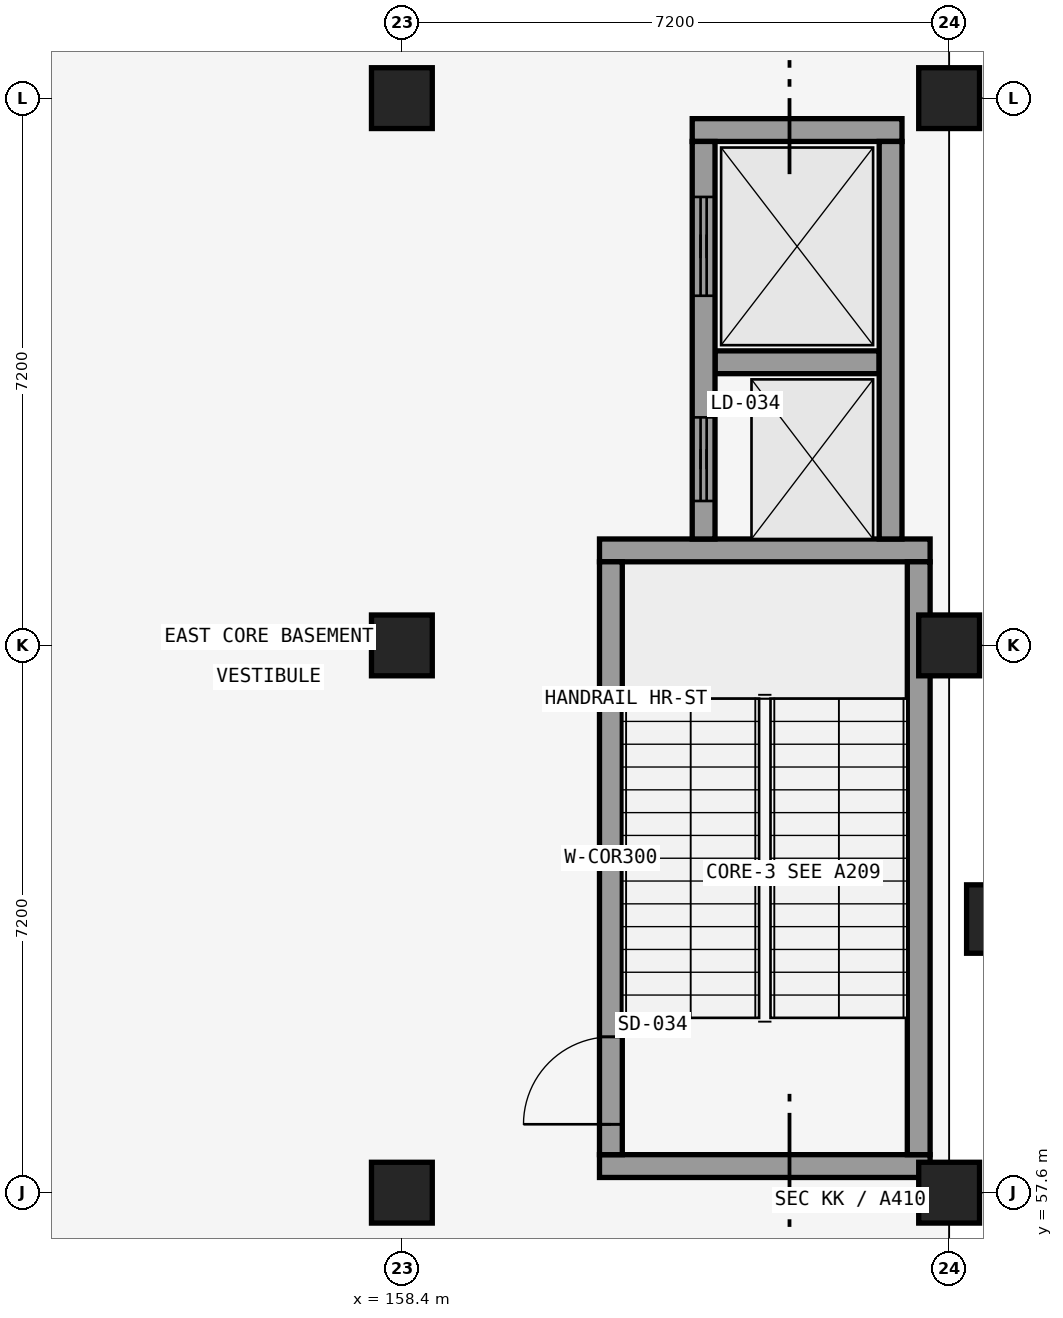
"""IFC4 building model, lengths in metres.
Left out: names, types, materials, properties, quantities, classifications, styles, units other than length and angle.
Written with IfcOpenShell. Run it as: python <this file> out.ifc"""

import sys

from ifc_helpers import new_model, si_unit, direction, frame, frame_2d, origin, origin_2d, place, context, subcontext, project, spatial, rectangle, extrude, element, fill, save


model = new_model("IFC4")
c1 = context("Model", 3, precision=1e-05, world=origin(), true_north=direction((0.0, 1.0)))
c2 = subcontext(c1, "Body", "Model", "MODEL_VIEW")
j1 = project(units=[si_unit("LENGTHUNIT", "METRE"), si_unit("PLANEANGLEUNIT", "RADIAN")], contexts=[c1])
p1 = place(None, origin())
s1 = spatial("IfcSite", under=j1, at=p1, CompositionType="ELEMENT")
p2 = place(p1, origin())
s2 = spatial("IfcBuilding", under=s1, at=p2, CompositionType="ELEMENT")
p3 = place(p2, frame((0.0, 0.0, -4.8)))
s3 = spatial("IfcBuildingStorey", under=s2, at=p3, CompositionType="ELEMENT", Elevation=-4.8)
for number, where, z_axis, x_axis in (
    (1, (158.4, 57.6, 0.0), (0.0, 0.0, 1.0), (1.0, 0.0, 0.0)),
    (2, (158.4, 64.8, 0.0), (0.0, 0.0, 1.0), (1.0, 0.0, 0.0)),
    (3, (158.4, 72.0, 0.0), (0.0, 0.0, 1.0), (1.0, 0.0, 0.0)),
    (4, (165.6, 57.6, 0.0), (0.0, 0.0, 1.0), (1.0, 0.0, 0.0)),
    (5, (165.6, 64.8, 0.0), (0.0, 0.0, 1.0), (1.0, 0.0, 0.0)),
    (6, (165.6, 72.0, 0.0), (0.0, 0.0, 1.0), (1.0, 0.0, 0.0)),
):
    element("IfcColumn", number, at=place(p3, frame(where, z_axis=z_axis, x_axis=x_axis)), inside=s3, PredefinedType="COLUMN", context=c2, shape_type="SweptSolid", body=[
        extrude(rectangle(XDim=0.8, YDim=0.8, at=origin_2d()), origin(), (0.0, 0.0, 1.0), 4.8),
    ])
p4 = place(p3, frame((166.08, 61.2, 0.0), z_axis=(0.0, 0.0, 1.0), x_axis=(1.0, 0.0, 0.0)))
e7 = element("IfcColumn", 7, at=p4, inside=s3, PredefinedType="PILASTER", context=c2, shape_type="SweptSolid", body=[
    extrude(rectangle(XDim=0.5, YDim=0.9, at=origin_2d()), origin(), (0.0, 0.0, 1.0), 4.8),
])
for number, where, z_axis, x_axis in (
    (8, (161.0, 57.95, 0.0), (0.0, 0.0, 1.0), (1.0, 0.0, 0.0)),
    (9, (161.0, 66.05, 0.0), (0.0, 0.0, 1.0), (1.0, 0.0, 0.0)),
):
    element("IfcWall", number, at=place(p3, frame(where, z_axis=z_axis, x_axis=x_axis)), inside=s3, PredefinedType="SHEAR", context=c2, shape_type="SweptSolid", body=[
        extrude(rectangle(XDim=4.35, YDim=0.3, at=frame_2d((2.175, 0.0))), origin(), (0.0, 0.0, 1.0), 4.4),
    ])
p5 = place(p3, frame((161.15, 58.1, 0.0), z_axis=(0.0, 0.0, 1.0), x_axis=(0.0, 1.0, 0.0)))
e10 = element("IfcWall", 10, at=p5, inside=s3, PredefinedType="SHEAR", context=c2, shape_type="SweptSolid", body=[
    extrude(rectangle(XDim=7.8, YDim=0.3, at=frame_2d((3.9, 0.0))), origin(), (0.0, 0.0, 1.0), 4.4),
])
p6 = place(p5, frame((0.4, 0.0, 0.0)))
e11 = element("IfcOpeningElement", 11, at=p6, cuts=e10, PredefinedType="OPENING", context=c2, shape_type="SweptSolid", body=[
    extrude(rectangle(XDim=1.15, YDim=2.2, at=frame_2d((0.575, 1.1))), frame((0.0, 0.16, 0.0), z_axis=(0.0, -1.0, 0.0), x_axis=(1.0, 0.0, 0.0)), (0.0, 0.0, 1.0), 0.32),
])
p7 = place(p3, frame((165.2, 58.1, 0.0), z_axis=(0.0, 0.0, 1.0), x_axis=(0.0, 1.0, 0.0)))
e12 = element("IfcWall", 12, at=p7, inside=s3, PredefinedType="SHEAR", context=c2, shape_type="SweptSolid", body=[
    extrude(rectangle(XDim=7.8, YDim=0.3, at=frame_2d((3.9, 0.0))), origin(), (0.0, 0.0, 1.0), 4.4),
])
p8 = place(p3, frame((162.22, 71.58, 0.0), z_axis=(0.0, 0.0, 1.0), x_axis=(1.0, 0.0, 0.0)))
e13 = element("IfcWall", 13, at=p8, inside=s3, PredefinedType="SHEAR", context=c2, shape_type="SweptSolid", body=[
    extrude(rectangle(XDim=2.76, YDim=0.3, at=frame_2d((1.38, 0.0))), origin(), (0.0, 0.0, 1.0), 4.4),
])
p9 = place(p3, frame((162.52, 68.525, 0.0), z_axis=(0.0, 0.0, 1.0), x_axis=(1.0, 0.0, 0.0)))
e14 = element("IfcWall", 14, at=p9, inside=s3, PredefinedType="SHEAR", context=c2, shape_type="SweptSolid", body=[
    extrude(rectangle(XDim=2.16, YDim=0.3, at=frame_2d((1.08, 0.0))), origin(), (0.0, 0.0, 1.0), 4.4),
])
p10 = place(p3, frame((162.37, 66.2, 0.0), z_axis=(0.0, 0.0, 1.0), x_axis=(0.0, 1.0, 0.0)))
e15 = element("IfcWall", 15, at=p10, inside=s3, PredefinedType="SHEAR", context=c2, shape_type="SweptSolid", body=[
    extrude(rectangle(XDim=5.23, YDim=0.3, at=frame_2d((2.615, 0.0))), origin(), (0.0, 0.0, 1.0), 4.4),
])
p11 = place(p10, frame((0.5, 0.0, 0.0)))
e16 = element("IfcOpeningElement", 16, at=p11, cuts=e15, PredefinedType="OPENING", context=c2, shape_type="SweptSolid", body=[
    extrude(rectangle(XDim=1.1, YDim=2.2, at=frame_2d((0.55, 1.1))), frame((0.0, 0.16, 0.0), z_axis=(0.0, -1.0, 0.0), x_axis=(1.0, 0.0, 0.0)), (0.0, 0.0, 1.0), 0.32),
])
p12 = place(p10, frame((3.2, 0.0, 0.0)))
e17 = element("IfcOpeningElement", 17, at=p12, cuts=e15, PredefinedType="OPENING", context=c2, shape_type="SweptSolid", body=[
    extrude(rectangle(XDim=1.3, YDim=2.2, at=frame_2d((0.65, 1.1))), frame((0.0, 0.16, 0.0), z_axis=(0.0, -1.0, 0.0), x_axis=(1.0, 0.0, 0.0)), (0.0, 0.0, 1.0), 0.32),
])
p13 = place(p3, frame((164.83, 66.2, 0.0), z_axis=(0.0, 0.0, 1.0), x_axis=(0.0, 1.0, 0.0)))
e18 = element("IfcWall", 18, at=p13, inside=s3, PredefinedType="SHEAR", context=c2, shape_type="SweptSolid", body=[
    extrude(rectangle(XDim=5.23, YDim=0.3, at=frame_2d((2.615, 0.0))), origin(), (0.0, 0.0, 1.0), 4.4),
])
p14 = place(p6, frame((1.15, 0.0, 0.0), z_axis=(0.0, 0.0, 1.0), x_axis=(-1.0, 0.0, 0.0)))
e19 = element("IfcDoor", 19, at=p14, inside=s3, OperationType="SINGLE_SWING_LEFT", PredefinedType="DOOR", context=c2, shape_type="SweptSolid", body=[
    extrude(rectangle(XDim=1.15, YDim=2.2, at=frame_2d((0.575, 1.1))), frame((0.0, 0.025, 0.0), z_axis=(0.0, -1.0, 0.0), x_axis=(1.0, 0.0, 0.0)), (0.0, 0.0, 1.0), 0.05),
])
fill(e11, e19)
p15 = place(p11, origin())
e20 = element("IfcDoor", 20, at=p15, inside=s3, OperationType="SLIDING_TO_LEFT", PredefinedType="DOOR", context=c2, shape_type="SweptSolid", body=[
    extrude(rectangle(XDim=1.1, YDim=2.2, at=frame_2d((0.55, 1.1))), frame((0.0, 0.025, 0.0), z_axis=(0.0, -1.0, 0.0), x_axis=(1.0, 0.0, 0.0)), (0.0, 0.0, 1.0), 0.05),
])
fill(e16, e20)
p16 = place(p12, origin())
e21 = element("IfcDoor", 21, at=p16, inside=s3, OperationType="SLIDING_TO_LEFT", PredefinedType="DOOR", context=c2, shape_type="SweptSolid", body=[
    extrude(rectangle(XDim=1.3, YDim=2.2, at=frame_2d((0.65, 1.1))), frame((0.0, 0.025, 0.0), z_axis=(0.0, -1.0, 0.0), x_axis=(1.0, 0.0, 0.0)), (0.0, 0.0, 1.0), 0.05),
])
fill(e17, e21)
save(model, sys.argv[1])
